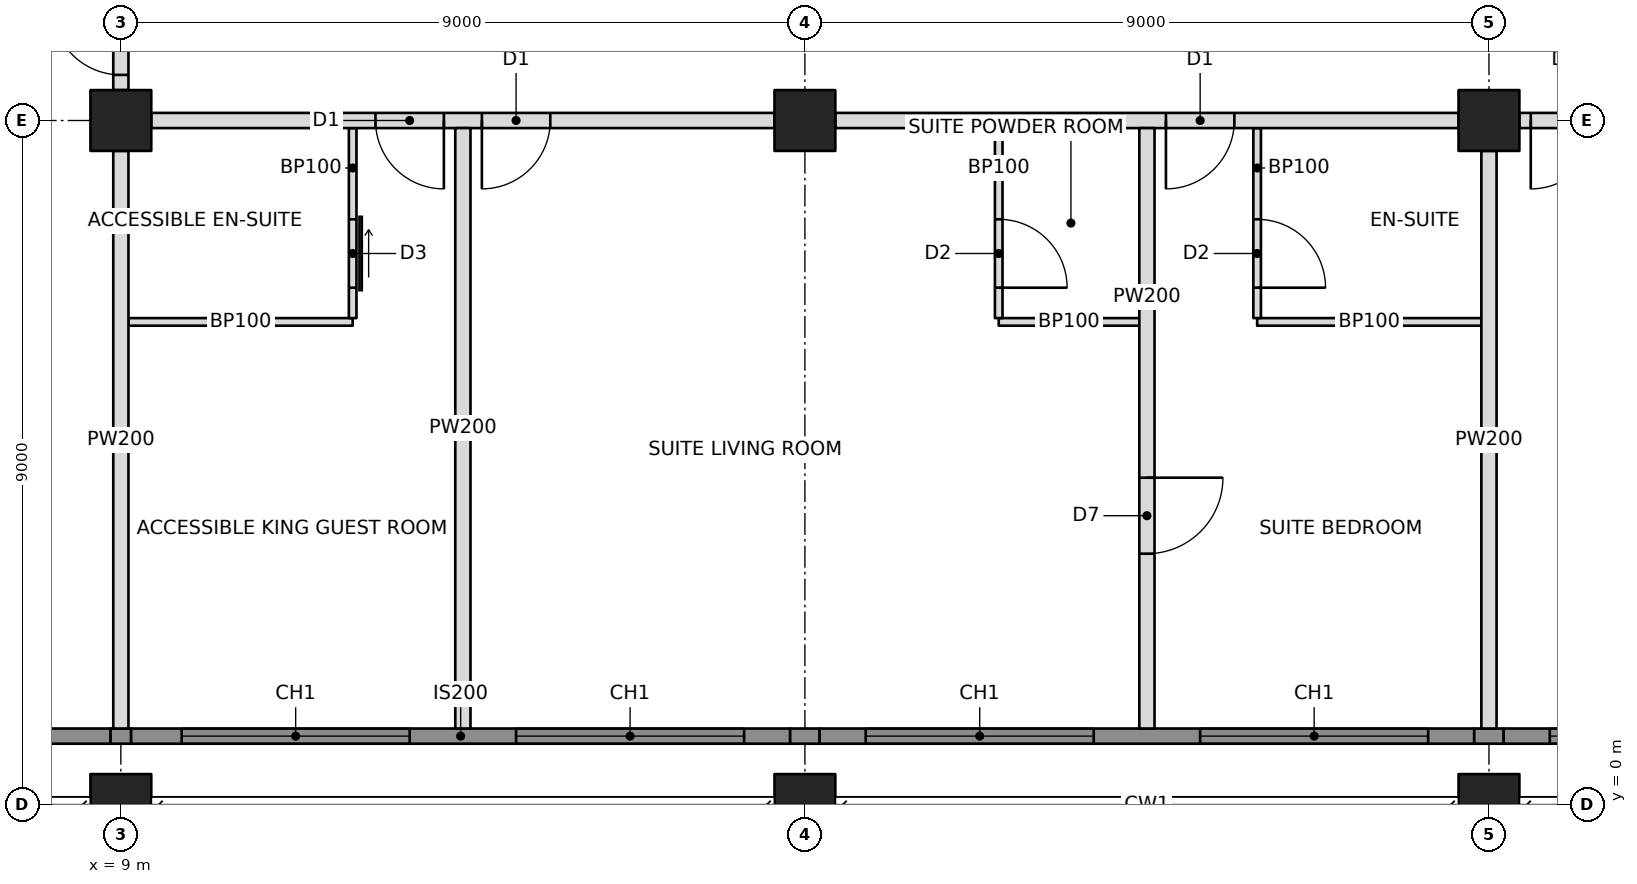
"""IFC4 building model, lengths in metres.
Left out: names, types, materials, properties, quantities, classifications, styles, units other than length and angle.
Written with IfcOpenShell. Run it as: python <this file> out.ifc"""

import sys

from ifc_helpers import new_model, si_unit, direction, frame, frame_2d, origin, origin_2d, place, context, subcontext, project, spatial, rectangle, hollow_rectangle, extrude, element, fill, save


model = new_model("IFC4")
c1 = context("Model", 3, precision=1e-05, world=origin(), true_north=direction((0.0, 1.0)))
c2 = subcontext(c1, "Body", "Model", "MODEL_VIEW")
j1 = project(units=[si_unit("LENGTHUNIT", "METRE"), si_unit("PLANEANGLEUNIT", "RADIAN")], contexts=[c1])
p1 = place(None, origin())
s1 = spatial("IfcSite", under=j1, at=p1, CompositionType="ELEMENT")
p2 = place(p1, origin())
s2 = spatial("IfcBuilding", under=s1, at=p2, CompositionType="ELEMENT")
p3 = place(p2, frame((0.0, 0.0, 197.8)))
s3 = spatial("IfcBuildingStorey", under=s2, at=p3, CompositionType="ELEMENT", Elevation=197.8)
p4 = place(p3, frame((9.0, 0.0, 0.0), z_axis=(0.0, 0.0, 1.0), x_axis=(1.0, 0.0, 0.0)))
e1 = element("IfcColumn", 1, at=p4, inside=s3, PredefinedType="COLUMN", context=c2, shape_type="SweptSolid", body=[
    extrude(hollow_rectangle(XDim=0.8, YDim=0.8, WallThickness=0.06, at=origin_2d()), origin(), (0.0, 0.0, 1.0), 3.4),
])
p5 = place(p3, frame((9.0, 9.0, 0.0), z_axis=(0.0, 0.0, 1.0), x_axis=(1.0, 0.0, 0.0)))
e2 = element("IfcColumn", 2, at=p5, inside=s3, PredefinedType="COLUMN", context=c2, shape_type="SweptSolid", body=[
    extrude(hollow_rectangle(XDim=0.8, YDim=0.8, WallThickness=0.05, at=origin_2d()), origin(), (0.0, 0.0, 1.0), 3.4),
])
p6 = place(p3, frame((18.0, 0.0, 0.0), z_axis=(0.0, 0.0, 1.0), x_axis=(1.0, 0.0, 0.0)))
e3 = element("IfcColumn", 3, at=p6, inside=s3, PredefinedType="COLUMN", context=c2, shape_type="SweptSolid", body=[
    extrude(hollow_rectangle(XDim=0.8, YDim=0.8, WallThickness=0.06, at=origin_2d()), origin(), (0.0, 0.0, 1.0), 3.4),
])
p7 = place(p3, frame((18.0, 9.0, 0.0), z_axis=(0.0, 0.0, 1.0), x_axis=(1.0, 0.0, 0.0)))
e4 = element("IfcColumn", 4, at=p7, inside=s3, PredefinedType="COLUMN", context=c2, shape_type="SweptSolid", body=[
    extrude(hollow_rectangle(XDim=0.8, YDim=0.8, WallThickness=0.05, at=origin_2d()), origin(), (0.0, 0.0, 1.0), 3.4),
])
p8 = place(p3, frame((27.0, 0.0, 0.0), z_axis=(0.0, 0.0, 1.0), x_axis=(1.0, 0.0, 0.0)))
e5 = element("IfcColumn", 5, at=p8, inside=s3, PredefinedType="COLUMN", context=c2, shape_type="SweptSolid", body=[
    extrude(hollow_rectangle(XDim=0.8, YDim=0.8, WallThickness=0.06, at=origin_2d()), origin(), (0.0, 0.0, 1.0), 3.4),
])
p9 = place(p3, frame((27.0, 9.0, 0.0), z_axis=(0.0, 0.0, 1.0), x_axis=(1.0, 0.0, 0.0)))
e6 = element("IfcColumn", 6, at=p9, inside=s3, PredefinedType="COLUMN", context=c2, shape_type="SweptSolid", body=[
    extrude(hollow_rectangle(XDim=0.8, YDim=0.8, WallThickness=0.05, at=origin_2d()), origin(), (0.0, 0.0, 1.0), 3.4),
])
p10 = place(p3, frame((3.0, 0.9, 0.0), z_axis=(0.0, 0.0, 1.0), x_axis=(1.0, 0.0, 0.0)))
e7 = element("IfcWall", 7, at=p10, inside=s3, PredefinedType="SOLIDWALL", context=c2, shape_type="SweptSolid", body=[
    extrude(rectangle(XDim=5.865, YDim=0.2, at=frame_2d((2.932, 0.0))), origin(), (0.0, 0.0, 1.0), 3.2),
])
p11 = place(p10, frame((1.45, 0.0, 0.6)))
e8 = element("IfcOpeningElement", 8, at=p11, cuts=e7, PredefinedType="OPENING", context=c2, shape_type="SweptSolid", body=[
    extrude(rectangle(XDim=3.0, YDim=2.2, at=frame_2d((1.5, 1.1))), frame((0.0, 0.11, 0.0), z_axis=(0.0, -1.0, 0.0), x_axis=(1.0, 0.0, 0.0)), (0.0, 0.0, 1.0), 0.22),
])
p12 = place(p3, frame((9.4, 9.0, 0.0), z_axis=(0.0, 0.0, 1.0), x_axis=(1.0, 0.0, 0.0)))
e9 = element("IfcWall", 9, at=p12, inside=s3, PredefinedType="PARTITIONING", context=c2, shape_type="SweptSolid", body=[
    extrude(rectangle(XDim=8.2, YDim=0.2, at=frame_2d((4.1, 0.0))), origin(), (0.0, 0.0, 1.0), 2.405),
])
p13 = place(p12, frame((2.95, 0.0, 0.0)))
e10 = element("IfcOpeningElement", 10, at=p13, cuts=e9, PredefinedType="OPENING", context=c2, shape_type="SweptSolid", body=[
    extrude(rectangle(XDim=0.9, YDim=2.1, at=frame_2d((0.45, 1.05))), frame((0.0, 0.11, 0.0), z_axis=(0.0, -1.0, 0.0), x_axis=(1.0, 0.0, 0.0)), (0.0, 0.0, 1.0), 0.22),
])
p14 = place(p12, frame((4.35, 0.0, 0.0)))
e11 = element("IfcOpeningElement", 11, at=p14, cuts=e9, PredefinedType="OPENING", context=c2, shape_type="SweptSolid", body=[
    extrude(rectangle(XDim=0.9, YDim=2.1, at=frame_2d((0.45, 1.05))), frame((0.0, 0.11, 0.0), z_axis=(0.0, -1.0, 0.0), x_axis=(1.0, 0.0, 0.0)), (0.0, 0.0, 1.0), 0.22),
])
p15 = place(p3, frame((18.4, 9.0, 0.0), z_axis=(0.0, 0.0, 1.0), x_axis=(1.0, 0.0, 0.0)))
e12 = element("IfcWall", 12, at=p15, inside=s3, PredefinedType="PARTITIONING", context=c2, shape_type="SweptSolid", body=[
    extrude(rectangle(XDim=8.2, YDim=0.2, at=frame_2d((4.1, 0.0))), origin(), (0.0, 0.0, 1.0), 2.405),
])
p16 = place(p15, frame((4.35, 0.0, 0.0)))
e13 = element("IfcOpeningElement", 13, at=p16, cuts=e12, PredefinedType="OPENING", context=c2, shape_type="SweptSolid", body=[
    extrude(rectangle(XDim=0.9, YDim=2.1, at=frame_2d((0.45, 1.05))), frame((0.0, 0.11, 0.0), z_axis=(0.0, -1.0, 0.0), x_axis=(1.0, 0.0, 0.0)), (0.0, 0.0, 1.0), 0.22),
])
p17 = place(p3, frame((27.4, 9.0, 0.0), z_axis=(0.0, 0.0, 1.0), x_axis=(1.0, 0.0, 0.0)))
e14 = element("IfcWall", 14, at=p17, inside=s3, PredefinedType="PARTITIONING", context=c2, shape_type="SweptSolid", body=[
    extrude(rectangle(XDim=8.2, YDim=0.2, at=frame_2d((4.1, 0.0))), origin(), (0.0, 0.0, 1.0), 2.405),
])
p18 = place(p17, frame((0.15, 0.0, 0.0)))
e15 = element("IfcOpeningElement", 15, at=p18, cuts=e14, PredefinedType="OPENING", context=c2, shape_type="SweptSolid", body=[
    extrude(rectangle(XDim=0.9, YDim=2.1, at=frame_2d((0.45, 1.05))), frame((0.0, 0.11, 0.0), z_axis=(0.0, -1.0, 0.0), x_axis=(1.0, 0.0, 0.0)), (0.0, 0.0, 1.0), 0.22),
])
p19 = place(p3, frame((9.0, 8.6, 0.0), z_axis=(0.0, 0.0, 1.0), x_axis=(0.0, -1.0, 0.0)))
e16 = element("IfcWall", 16, at=p19, inside=s3, PredefinedType="PARTITIONING", context=c2, shape_type="SweptSolid", body=[
    extrude(rectangle(XDim=7.6, YDim=0.2, at=frame_2d((3.8, 0.0))), origin(), (0.0, 0.0, 1.0), 2.438),
])
p20 = place(p3, frame((13.5, 8.9, 0.0), z_axis=(0.0, 0.0, 1.0), x_axis=(0.0, -1.0, 0.0)))
e17 = element("IfcWall", 17, at=p20, inside=s3, PredefinedType="PARTITIONING", context=c2, shape_type="SweptSolid", body=[
    extrude(rectangle(XDim=7.9, YDim=0.2, at=frame_2d((3.95, 0.0))), origin(), (0.0, 0.0, 1.0), 2.404),
])
p21 = place(p3, frame((22.5, 8.9, 0.0), z_axis=(0.0, 0.0, 1.0), x_axis=(0.0, -1.0, 0.0)))
e18 = element("IfcWall", 18, at=p21, inside=s3, PredefinedType="PARTITIONING", context=c2, shape_type="SweptSolid", body=[
    extrude(rectangle(XDim=7.9, YDim=0.2, at=frame_2d((3.95, 0.0))), origin(), (0.0, 0.0, 1.0), 2.404),
])
p22 = place(p21, frame((4.6, 0.0, 0.0)))
e19 = element("IfcOpeningElement", 19, at=p22, cuts=e18, PredefinedType="OPENING", context=c2, shape_type="SweptSolid", body=[
    extrude(rectangle(XDim=1.0, YDim=2.1, at=frame_2d((0.5, 1.05))), frame((0.0, 0.11, 0.0), z_axis=(0.0, -1.0, 0.0), x_axis=(1.0, 0.0, 0.0)), (0.0, 0.0, 1.0), 0.22),
])
p23 = place(p3, frame((27.0, 8.6, 0.0), z_axis=(0.0, 0.0, 1.0), x_axis=(0.0, -1.0, 0.0)))
e20 = element("IfcWall", 20, at=p23, inside=s3, PredefinedType="PARTITIONING", context=c2, shape_type="SweptSolid", body=[
    extrude(rectangle(XDim=7.6, YDim=0.2, at=frame_2d((3.8, 0.0))), origin(), (0.0, 0.0, 1.0), 2.405),
])
p24 = place(p3, frame((9.1, 6.35, 0.0), z_axis=(0.0, 0.0, 1.0), x_axis=(1.0, 0.0, 0.0)))
e21 = element("IfcWall", 21, at=p24, inside=s3, PredefinedType="PARTITIONING", context=c2, shape_type="SweptSolid", body=[
    extrude(rectangle(XDim=2.95, YDim=0.1, at=frame_2d((1.475, 0.0))), origin(), (0.0, 0.0, 1.0), 2.438),
])
p25 = place(p3, frame((12.05, 8.9, 0.0), z_axis=(0.0, 0.0, 1.0), x_axis=(0.0, -1.0, 0.0)))
e22 = element("IfcWall", 22, at=p25, inside=s3, PredefinedType="PARTITIONING", context=c2, shape_type="SweptSolid", body=[
    extrude(rectangle(XDim=2.5, YDim=0.1, at=frame_2d((1.25, 0.0))), origin(), (0.0, 0.0, 1.0), 2.404),
])
p26 = place(p25, frame((1.2, 0.0, 0.0)))
e23 = element("IfcOpeningElement", 23, at=p26, cuts=e22, PredefinedType="OPENING", context=c2, shape_type="SweptSolid", body=[
    extrude(rectangle(XDim=0.9, YDim=2.1, at=frame_2d((0.45, 1.05))), frame((0.0, 0.06, 0.0), z_axis=(0.0, -1.0, 0.0), x_axis=(1.0, 0.0, 0.0)), (0.0, 0.0, 1.0), 0.12),
])
p27 = place(p3, frame((20.55, 6.35, 0.0), z_axis=(0.0, 0.0, 1.0), x_axis=(1.0, 0.0, 0.0)))
e24 = element("IfcWall", 24, at=p27, inside=s3, PredefinedType="PARTITIONING", context=c2, shape_type="SweptSolid", body=[
    extrude(rectangle(XDim=1.85, YDim=0.1, at=frame_2d((0.925, 0.0))), origin(), (0.0, 0.0, 1.0), 3.2),
])
p28 = place(p3, frame((20.55, 8.9, 0.0), z_axis=(0.0, 0.0, 1.0), x_axis=(0.0, -1.0, 0.0)))
e25 = element("IfcWall", 25, at=p28, inside=s3, PredefinedType="PARTITIONING", context=c2, shape_type="SweptSolid", body=[
    extrude(rectangle(XDim=2.5, YDim=0.1, at=frame_2d((1.25, 0.0))), origin(), (0.0, 0.0, 1.0), 2.404),
])
p29 = place(p28, frame((1.2, 0.0, 0.0)))
e26 = element("IfcOpeningElement", 26, at=p29, cuts=e25, PredefinedType="OPENING", context=c2, shape_type="SweptSolid", body=[
    extrude(rectangle(XDim=0.9, YDim=2.1, at=frame_2d((0.45, 1.05))), frame((0.0, 0.06, 0.0), z_axis=(0.0, -1.0, 0.0), x_axis=(1.0, 0.0, 0.0)), (0.0, 0.0, 1.0), 0.12),
])
p30 = place(p3, frame((23.95, 6.35, 0.0), z_axis=(0.0, 0.0, 1.0), x_axis=(1.0, 0.0, 0.0)))
e27 = element("IfcWall", 27, at=p30, inside=s3, PredefinedType="PARTITIONING", context=c2, shape_type="SweptSolid", body=[
    extrude(rectangle(XDim=2.95, YDim=0.1, at=frame_2d((1.475, 0.0))), origin(), (0.0, 0.0, 1.0), 2.404),
])
p31 = place(p3, frame((23.95, 8.9, 0.0), z_axis=(0.0, 0.0, 1.0), x_axis=(0.0, -1.0, 0.0)))
e28 = element("IfcWall", 28, at=p31, inside=s3, PredefinedType="PARTITIONING", context=c2, shape_type="SweptSolid", body=[
    extrude(rectangle(XDim=2.5, YDim=0.1, at=frame_2d((1.25, 0.0))), origin(), (0.0, 0.0, 1.0), 2.404),
])
p32 = place(p31, frame((1.2, 0.0, 0.0)))
e29 = element("IfcOpeningElement", 29, at=p32, cuts=e28, PredefinedType="OPENING", context=c2, shape_type="SweptSolid", body=[
    extrude(rectangle(XDim=0.9, YDim=2.1, at=frame_2d((0.45, 1.05))), frame((0.0, 0.06, 0.0), z_axis=(0.0, -1.0, 0.0), x_axis=(1.0, 0.0, 0.0)), (0.0, 0.0, 1.0), 0.12),
])
p33 = place(p3, frame((9.0, 9.4, 0.0), z_axis=(0.0, 0.0, 1.0), x_axis=(0.0, 1.0, 0.0)))
e30 = element("IfcWall", 30, at=p33, inside=s3, PredefinedType="PARTITIONING", context=c2, shape_type="SweptSolid", body=[
    extrude(rectangle(XDim=1.3, YDim=0.2, at=frame_2d((0.65, 0.0))), origin(), (0.0, 0.0, 1.0), 2.405),
])
p34 = place(p33, frame((0.2, 0.0, 0.0)))
e31 = element("IfcOpeningElement", 31, at=p34, cuts=e30, PredefinedType="OPENING", context=c2, shape_type="SweptSolid", body=[
    extrude(rectangle(XDim=0.9, YDim=2.1, at=frame_2d((0.45, 1.05))), frame((0.0, 0.11, 0.0), z_axis=(0.0, -1.0, 0.0), x_axis=(1.0, 0.0, 0.0)), (0.0, 0.0, 1.0), 0.22),
])
p35 = place(p3, frame((8.865, 0.9, 0.0), z_axis=(0.0, 0.0, 1.0), x_axis=(1.0, 0.0, 0.0)))
e32 = element("IfcWall", 32, at=p35, inside=s3, PredefinedType="SOLIDWALL", context=c2, shape_type="SweptSolid", body=[
    extrude(rectangle(XDim=0.271, YDim=0.2, at=frame_2d((0.135, 0.0))), origin(), (0.0, 0.0, 1.0), 2.438),
])
p36 = place(p3, frame((9.135, 0.9, 0.0), z_axis=(0.0, 0.0, 1.0), x_axis=(1.0, 0.0, 0.0)))
e33 = element("IfcWall", 33, at=p36, inside=s3, PredefinedType="SOLIDWALL", context=c2, shape_type="SweptSolid", body=[
    extrude(rectangle(XDim=8.671, YDim=0.2, at=frame_2d((4.335, 0.0))), origin(), (0.0, 0.0, 1.0), 3.2),
])
p37 = place(p36, frame((0.665, 0.0, 0.6)))
e34 = element("IfcOpeningElement", 34, at=p37, cuts=e33, PredefinedType="OPENING", context=c2, shape_type="SweptSolid", body=[
    extrude(rectangle(XDim=3.0, YDim=2.2, at=frame_2d((1.5, 1.1))), frame((0.0, 0.11, 0.0), z_axis=(0.0, -1.0, 0.0), x_axis=(1.0, 0.0, 0.0)), (0.0, 0.0, 1.0), 0.22),
])
p38 = place(p36, frame((5.065, 0.0, 0.6)))
e35 = element("IfcOpeningElement", 35, at=p38, cuts=e33, PredefinedType="OPENING", context=c2, shape_type="SweptSolid", body=[
    extrude(rectangle(XDim=3.0, YDim=2.2, at=frame_2d((1.5, 1.1))), frame((0.0, 0.11, 0.0), z_axis=(0.0, -1.0, 0.0), x_axis=(1.0, 0.0, 0.0)), (0.0, 0.0, 1.0), 0.22),
])
p39 = place(p3, frame((17.806, 0.9, 0.0), z_axis=(0.0, 0.0, 1.0), x_axis=(1.0, 0.0, 0.0)))
e36 = element("IfcWall", 36, at=p39, inside=s3, PredefinedType="SOLIDWALL", context=c2, shape_type="SweptSolid", body=[
    extrude(rectangle(XDim=0.388, YDim=0.2, at=frame_2d((0.194, 0.0))), origin(), (0.0, 0.0, 1.0), 2.404),
])
p40 = place(p3, frame((18.194, 0.9, 0.0), z_axis=(0.0, 0.0, 1.0), x_axis=(1.0, 0.0, 0.0)))
e37 = element("IfcWall", 37, at=p40, inside=s3, PredefinedType="SOLIDWALL", context=c2, shape_type="SweptSolid", body=[
    extrude(rectangle(XDim=8.612, YDim=0.2, at=frame_2d((4.306, 0.0))), origin(), (0.0, 0.0, 1.0), 3.2),
])
p41 = place(p40, frame((0.606, 0.0, 0.6)))
e38 = element("IfcOpeningElement", 38, at=p41, cuts=e37, PredefinedType="OPENING", context=c2, shape_type="SweptSolid", body=[
    extrude(rectangle(XDim=3.0, YDim=2.2, at=frame_2d((1.5, 1.1))), frame((0.0, 0.11, 0.0), z_axis=(0.0, -1.0, 0.0), x_axis=(1.0, 0.0, 0.0)), (0.0, 0.0, 1.0), 0.22),
])
p42 = place(p40, frame((5.006, 0.0, 0.6)))
e39 = element("IfcOpeningElement", 39, at=p42, cuts=e37, PredefinedType="OPENING", context=c2, shape_type="SweptSolid", body=[
    extrude(rectangle(XDim=3.0, YDim=2.2, at=frame_2d((1.5, 1.1))), frame((0.0, 0.11, 0.0), z_axis=(0.0, -1.0, 0.0), x_axis=(1.0, 0.0, 0.0)), (0.0, 0.0, 1.0), 0.22),
])
p43 = place(p3, frame((26.806, 0.9, 0.0), z_axis=(0.0, 0.0, 1.0), x_axis=(1.0, 0.0, 0.0)))
e40 = element("IfcWall", 40, at=p43, inside=s3, PredefinedType="SOLIDWALL", context=c2, shape_type="SweptSolid", body=[
    extrude(rectangle(XDim=0.388, YDim=0.2, at=frame_2d((0.194, 0.0))), origin(), (0.0, 0.0, 1.0), 2.404),
])
p44 = place(p3, frame((27.194, 0.9, 0.0), z_axis=(0.0, 0.0, 1.0), x_axis=(1.0, 0.0, 0.0)))
e41 = element("IfcWall", 41, at=p44, inside=s3, PredefinedType="SOLIDWALL", context=c2, shape_type="SweptSolid", body=[
    extrude(rectangle(XDim=8.671, YDim=0.2, at=frame_2d((4.335, 0.0))), origin(), (0.0, 0.0, 1.0), 3.2),
])
p45 = place(p44, frame((0.606, 0.0, 0.6)))
e42 = element("IfcOpeningElement", 42, at=p45, cuts=e41, PredefinedType="OPENING", context=c2, shape_type="SweptSolid", body=[
    extrude(rectangle(XDim=3.0, YDim=2.2, at=frame_2d((1.5, 1.1))), frame((0.0, 0.11, 0.0), z_axis=(0.0, -1.0, 0.0), x_axis=(1.0, 0.0, 0.0)), (0.0, 0.0, 1.0), 0.22),
])
p46 = place(p44, frame((5.006, 0.0, 0.6)))
e43 = element("IfcOpeningElement", 43, at=p46, cuts=e41, PredefinedType="OPENING", context=c2, shape_type="SweptSolid", body=[
    extrude(rectangle(XDim=3.0, YDim=2.2, at=frame_2d((1.5, 1.1))), frame((0.0, 0.11, 0.0), z_axis=(0.0, -1.0, 0.0), x_axis=(1.0, 0.0, 0.0)), (0.0, 0.0, 1.0), 0.22),
])
p47 = place(p37, origin())
e44 = element("IfcWindow", 44, at=p47, inside=s3, PartitioningType="TRIPLE_PANEL_VERTICAL", PredefinedType="WINDOW", context=c2, shape_type="SweptSolid", body=[
    extrude(rectangle(XDim=3.0, YDim=2.2, at=frame_2d((1.5, 1.1))), frame((0.0, 0.03, 0.0), z_axis=(0.0, -1.0, 0.0), x_axis=(1.0, 0.0, 0.0)), (0.0, 0.0, 1.0), 0.06),
])
fill(e34, e44)
p48 = place(p38, origin())
e45 = element("IfcWindow", 45, at=p48, inside=s3, PartitioningType="TRIPLE_PANEL_VERTICAL", PredefinedType="WINDOW", context=c2, shape_type="SweptSolid", body=[
    extrude(rectangle(XDim=3.0, YDim=2.2, at=frame_2d((1.5, 1.1))), frame((0.0, 0.03, 0.0), z_axis=(0.0, -1.0, 0.0), x_axis=(1.0, 0.0, 0.0)), (0.0, 0.0, 1.0), 0.06),
])
fill(e35, e45)
p49 = place(p41, origin())
e46 = element("IfcWindow", 46, at=p49, inside=s3, PartitioningType="TRIPLE_PANEL_VERTICAL", PredefinedType="WINDOW", context=c2, shape_type="SweptSolid", body=[
    extrude(rectangle(XDim=3.0, YDim=2.2, at=frame_2d((1.5, 1.1))), frame((0.0, 0.03, 0.0), z_axis=(0.0, -1.0, 0.0), x_axis=(1.0, 0.0, 0.0)), (0.0, 0.0, 1.0), 0.06),
])
fill(e38, e46)
p50 = place(p42, origin())
e47 = element("IfcWindow", 47, at=p50, inside=s3, PartitioningType="TRIPLE_PANEL_VERTICAL", PredefinedType="WINDOW", context=c2, shape_type="SweptSolid", body=[
    extrude(rectangle(XDim=3.0, YDim=2.2, at=frame_2d((1.5, 1.1))), frame((0.0, 0.03, 0.0), z_axis=(0.0, -1.0, 0.0), x_axis=(1.0, 0.0, 0.0)), (0.0, 0.0, 1.0), 0.06),
])
fill(e39, e47)
p51 = place(p45, origin())
e48 = element("IfcWindow", 48, at=p51, inside=s3, PartitioningType="TRIPLE_PANEL_VERTICAL", PredefinedType="WINDOW", context=c2, shape_type="SweptSolid", body=[
    extrude(rectangle(XDim=3.0, YDim=2.2, at=frame_2d((1.5, 1.1))), frame((0.0, 0.03, 0.0), z_axis=(0.0, -1.0, 0.0), x_axis=(1.0, 0.0, 0.0)), (0.0, 0.0, 1.0), 0.06),
])
fill(e42, e48)
p52 = place(p22, origin())
e49 = element("IfcDoor", 49, at=p52, inside=s3, OperationType="SINGLE_SWING_LEFT", PredefinedType="DOOR", context=c2, shape_type="SweptSolid", body=[
    extrude(rectangle(XDim=1.0, YDim=2.1, at=frame_2d((0.5, 1.05))), frame((0.0, 0.025, 0.0), z_axis=(0.0, -1.0, 0.0), x_axis=(1.0, 0.0, 0.0)), (0.0, 0.0, 1.0), 0.05),
])
fill(e19, e49)
p53 = place(p26, origin())
e50 = element("IfcDoor", 50, at=p53, inside=s3, OperationType="SLIDING_TO_LEFT", PredefinedType="DOOR", context=c2, shape_type="SweptSolid", body=[
    extrude(rectangle(XDim=0.9, YDim=2.1, at=frame_2d((0.45, 1.05))), frame((0.0, 0.025, 0.0), z_axis=(0.0, -1.0, 0.0), x_axis=(1.0, 0.0, 0.0)), (0.0, 0.0, 1.0), 0.05),
])
fill(e23, e50)
p54 = place(p13, frame((0.9, 0.0, 0.0), z_axis=(0.0, 0.0, 1.0), x_axis=(-1.0, 0.0, 0.0)))
e51 = element("IfcDoor", 51, at=p54, inside=s3, OperationType="SINGLE_SWING_LEFT", PredefinedType="DOOR", context=c2, shape_type="SweptSolid", body=[
    extrude(rectangle(XDim=0.9, YDim=2.1, at=frame_2d((0.45, 1.05))), frame((0.0, 0.025, 0.0), z_axis=(0.0, -1.0, 0.0), x_axis=(1.0, 0.0, 0.0)), (0.0, 0.0, 1.0), 0.05),
])
fill(e10, e51)
p55 = place(p29, origin())
e52 = element("IfcDoor", 52, at=p55, inside=s3, OperationType="SINGLE_SWING_RIGHT", PredefinedType="DOOR", context=c2, shape_type="SweptSolid", body=[
    extrude(rectangle(XDim=0.9, YDim=2.1, at=frame_2d((0.45, 1.05))), frame((0.0, 0.025, 0.0), z_axis=(0.0, -1.0, 0.0), x_axis=(1.0, 0.0, 0.0)), (0.0, 0.0, 1.0), 0.05),
])
fill(e26, e52)
p56 = place(p14, frame((0.9, 0.0, 0.0), z_axis=(0.0, 0.0, 1.0), x_axis=(-1.0, 0.0, 0.0)))
e53 = element("IfcDoor", 53, at=p56, inside=s3, OperationType="SINGLE_SWING_RIGHT", PredefinedType="DOOR", context=c2, shape_type="SweptSolid", body=[
    extrude(rectangle(XDim=0.9, YDim=2.1, at=frame_2d((0.45, 1.05))), frame((0.0, 0.025, 0.0), z_axis=(0.0, -1.0, 0.0), x_axis=(1.0, 0.0, 0.0)), (0.0, 0.0, 1.0), 0.05),
])
fill(e11, e53)
p57 = place(p32, origin())
e54 = element("IfcDoor", 54, at=p57, inside=s3, OperationType="SINGLE_SWING_RIGHT", PredefinedType="DOOR", context=c2, shape_type="SweptSolid", body=[
    extrude(rectangle(XDim=0.9, YDim=2.1, at=frame_2d((0.45, 1.05))), frame((0.0, 0.025, 0.0), z_axis=(0.0, -1.0, 0.0), x_axis=(1.0, 0.0, 0.0)), (0.0, 0.0, 1.0), 0.05),
])
fill(e29, e54)
p58 = place(p16, frame((0.9, 0.0, 0.0), z_axis=(0.0, 0.0, 1.0), x_axis=(-1.0, 0.0, 0.0)))
e55 = element("IfcDoor", 55, at=p58, inside=s3, OperationType="SINGLE_SWING_RIGHT", PredefinedType="DOOR", context=c2, shape_type="SweptSolid", body=[
    extrude(rectangle(XDim=0.9, YDim=2.1, at=frame_2d((0.45, 1.05))), frame((0.0, 0.025, 0.0), z_axis=(0.0, -1.0, 0.0), x_axis=(1.0, 0.0, 0.0)), (0.0, 0.0, 1.0), 0.05),
])
fill(e13, e55)
p59 = place(p18, frame((0.9, 0.0, 0.0), z_axis=(0.0, 0.0, 1.0), x_axis=(-1.0, 0.0, 0.0)))
e56 = element("IfcDoor", 56, at=p59, inside=s3, OperationType="SINGLE_SWING_RIGHT", PredefinedType="DOOR", context=c2, shape_type="SweptSolid", body=[
    extrude(rectangle(XDim=0.9, YDim=2.1, at=frame_2d((0.45, 1.05))), frame((0.0, 0.025, 0.0), z_axis=(0.0, -1.0, 0.0), x_axis=(1.0, 0.0, 0.0)), (0.0, 0.0, 1.0), 0.05),
])
fill(e15, e56)
p60 = place(p34, origin())
e57 = element("IfcDoor", 57, at=p60, inside=s3, OperationType="SINGLE_SWING_RIGHT", PredefinedType="DOOR", context=c2, shape_type="SweptSolid", body=[
    extrude(rectangle(XDim=0.9, YDim=2.1, at=frame_2d((0.45, 1.05))), frame((0.0, 0.025, 0.0), z_axis=(0.0, -1.0, 0.0), x_axis=(1.0, 0.0, 0.0)), (0.0, 0.0, 1.0), 0.05),
])
fill(e31, e57)
save(model, sys.argv[1])
